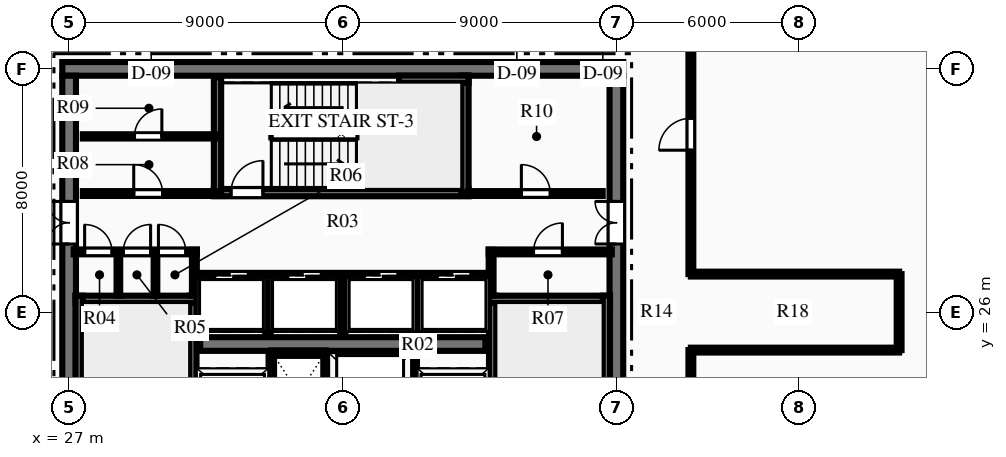
"""IFC4 building model, lengths in metres.
Left out: names, types, materials, properties, quantities, classifications, styles, units other than length and angle.
Written with IfcOpenShell. Run it as: python <this file> out.ifc"""

import sys

from ifc_helpers import new_model, si_unit, direction, frame, frame_2d, origin, place, context, subcontext, project, spatial, rectangle, extrude, element, fill, save


model = new_model("IFC4")
c1 = context("Model", 3, precision=1e-05, world=origin(), true_north=direction((0.0, 1.0)))
c2 = subcontext(c1, "Body", "Model", "MODEL_VIEW")
j1 = project(units=[si_unit("LENGTHUNIT", "METRE"), si_unit("PLANEANGLEUNIT", "RADIAN")], contexts=[c1])
p1 = place(None, origin())
s1 = spatial("IfcSite", under=j1, at=p1, CompositionType="ELEMENT")
p2 = place(p1, origin())
s2 = spatial("IfcBuilding", under=s1, at=p2, CompositionType="ELEMENT")
p3 = place(p2, frame((0.0, 0.0, 328.95)))
s3 = spatial("IfcBuildingStorey", under=s2, at=p3, CompositionType="ELEMENT", Elevation=328.95)
p4 = place(p3, frame((26.775, 34.0, 0.0), z_axis=(0.0, 0.0, 1.0), x_axis=(1.0, 0.0, 0.0)))
e1 = element("IfcWall", 1, at=p4, inside=s3, PredefinedType="SHEAR", context=c2, shape_type="SweptSolid", body=[
    extrude(rectangle(XDim=18.45, YDim=0.45, at=frame_2d((9.225, 0.0))), origin(), (0.0, 0.0, 1.0), 3.75),
])
p5 = place(p3, frame((27.0, 18.225, 0.0), z_axis=(0.0, 0.0, 1.0), x_axis=(0.0, 1.0, 0.0)))
e2 = element("IfcWall", 2, at=p5, inside=s3, PredefinedType="SHEAR", context=c2, shape_type="SweptSolid", body=[
    extrude(rectangle(XDim=15.55, YDim=0.45, at=frame_2d((7.775, 0.0))), origin(), (0.0, 0.0, 1.0), 3.75),
])
p6 = place(p5, frame((10.015, 0.0, 0.0)))
e3 = element("IfcOpeningElement", 3, at=p6, cuts=e2, PredefinedType="OPENING", context=c2, shape_type="SweptSolid", body=[
    extrude(rectangle(XDim=1.4, YDim=2.2, at=frame_2d((0.7, 1.1))), frame((0.0, 0.235, 0.0), z_axis=(0.0, -1.0, 0.0), x_axis=(1.0, 0.0, 0.0)), (0.0, 0.0, 1.0), 0.47),
])
p7 = place(p3, frame((45.0, 18.225, 0.0), z_axis=(0.0, 0.0, 1.0), x_axis=(0.0, 1.0, 0.0)))
e4 = element("IfcWall", 4, at=p7, inside=s3, PredefinedType="SHEAR", context=c2, shape_type="SweptSolid", body=[
    extrude(rectangle(XDim=15.55, YDim=0.45, at=frame_2d((7.775, 0.0))), origin(), (0.0, 0.0, 1.0), 3.75),
])
p8 = place(p7, frame((10.015, 0.0, 0.0)))
e5 = element("IfcOpeningElement", 5, at=p8, cuts=e4, PredefinedType="OPENING", context=c2, shape_type="SweptSolid", body=[
    extrude(rectangle(XDim=1.4, YDim=2.2, at=frame_2d((0.7, 1.1))), frame((0.0, 0.235, 0.0), z_axis=(0.0, -1.0, 0.0), x_axis=(1.0, 0.0, 0.0)), (0.0, 0.0, 1.0), 0.47),
])
p9 = place(p3, frame((31.31, 24.95, 0.0), z_axis=(0.0, 0.0, 1.0), x_axis=(1.0, 0.0, 0.0)))
e6 = element("IfcWall", 6, at=p9, inside=s3, PredefinedType="SHEAR", context=c2, shape_type="SweptSolid", body=[
    extrude(rectangle(XDim=9.38, YDim=0.45, at=frame_2d((4.69, 0.0))), origin(), (0.0, 0.0, 1.0), 3.75),
])
p10 = place(p3, frame((31.07, 18.28, 0.0), z_axis=(0.0, 0.0, 1.0), x_axis=(0.0, 1.0, 0.0)))
e7 = element("IfcWall", 7, at=p10, inside=s3, PredefinedType="SHEAR", context=c2, shape_type="SweptSolid", body=[
    extrude(rectangle(XDim=8.26, YDim=0.24, at=frame_2d((4.13, 0.0))), origin(), (0.0, 0.0, 1.0), 3.75),
])
p11 = place(p10, frame((0.365, 0.0, 0.0)))
e8 = element("IfcOpeningElement", 8, at=p11, cuts=e7, PredefinedType="OPENING", context=c2, shape_type="SweptSolid", body=[
    extrude(rectangle(XDim=1.05, YDim=2.15, at=frame_2d((0.525, 1.075))), frame((0.0, 0.13, 0.0), z_axis=(0.0, -1.0, 0.0), x_axis=(1.0, 0.0, 0.0)), (0.0, 0.0, 1.0), 0.26),
])
p12 = place(p3, frame((27.21, 26.42, 0.0), z_axis=(0.0, 0.0, 1.0), x_axis=(1.0, 0.0, 0.0)))
e9 = element("IfcWall", 9, at=p12, inside=s3, PredefinedType="SHEAR", context=c2, shape_type="SweptSolid", body=[
    extrude(rectangle(XDim=3.98, YDim=0.24, at=frame_2d((1.99, 0.0))), origin(), (0.0, 0.0, 1.0), 3.75),
])
p13 = place(p3, frame((27.33, 18.28, 0.0), z_axis=(0.0, 0.0, 1.0), x_axis=(0.0, 1.0, 0.0)))
e10 = element("IfcWall", 10, at=p13, inside=s3, PredefinedType="SHEAR", context=c2, shape_type="SweptSolid", body=[
    extrude(rectangle(XDim=8.26, YDim=0.24, at=frame_2d((4.13, 0.0))), origin(), (0.0, 0.0, 1.0), 3.75),
])
p14 = place(p3, frame((40.93, 18.28, 0.0), z_axis=(0.0, 0.0, 1.0), x_axis=(0.0, 1.0, 0.0)))
e11 = element("IfcWall", 11, at=p14, inside=s3, PredefinedType="SHEAR", context=c2, shape_type="SweptSolid", body=[
    extrude(rectangle(XDim=8.26, YDim=0.24, at=frame_2d((4.13, 0.0))), origin(), (0.0, 0.0, 1.0), 3.75),
])
p15 = place(p14, frame((0.365, 0.0, 0.0)))
e12 = element("IfcOpeningElement", 12, at=p15, cuts=e11, PredefinedType="OPENING", context=c2, shape_type="SweptSolid", body=[
    extrude(rectangle(XDim=1.05, YDim=2.15, at=frame_2d((0.525, 1.075))), frame((0.0, 0.13, 0.0), z_axis=(0.0, -1.0, 0.0), x_axis=(1.0, 0.0, 0.0)), (0.0, 0.0, 1.0), 0.26),
])
p16 = place(p3, frame((40.81, 26.42, 0.0), z_axis=(0.0, 0.0, 1.0), x_axis=(1.0, 0.0, 0.0)))
e13 = element("IfcWall", 13, at=p16, inside=s3, PredefinedType="SHEAR", context=c2, shape_type="SweptSolid", body=[
    extrude(rectangle(XDim=3.98, YDim=0.24, at=frame_2d((1.99, 0.0))), origin(), (0.0, 0.0, 1.0), 3.75),
])
p17 = place(p3, frame((44.67, 18.28, 0.0), z_axis=(0.0, 0.0, 1.0), x_axis=(0.0, 1.0, 0.0)))
e14 = element("IfcWall", 14, at=p17, inside=s3, PredefinedType="SHEAR", context=c2, shape_type="SweptSolid", body=[
    extrude(rectangle(XDim=8.26, YDim=0.24, at=frame_2d((4.13, 0.0))), origin(), (0.0, 0.0, 1.0), 3.75),
])
p18 = place(p3, frame((31.76, 29.93, 0.0), z_axis=(0.0, 0.0, 1.0), x_axis=(1.0, 0.0, 0.0)))
e15 = element("IfcWall", 15, at=p18, inside=s3, PredefinedType="SHEAR", context=c2, shape_type="SweptSolid", body=[
    extrude(rectangle(XDim=8.38, YDim=0.24, at=frame_2d((4.19, 0.0))), origin(), (0.0, 0.0, 1.0), 3.75),
])
p19 = place(p18, frame((0.565, 0.0, 0.0)))
e16 = element("IfcOpeningElement", 16, at=p19, cuts=e15, PredefinedType="OPENING", context=c2, shape_type="SweptSolid", body=[
    extrude(rectangle(XDim=1.05, YDim=2.15, at=frame_2d((0.525, 1.075))), frame((0.0, 0.13, 0.0), z_axis=(0.0, -1.0, 0.0), x_axis=(1.0, 0.0, 0.0)), (0.0, 0.0, 1.0), 0.26),
])
p20 = place(p3, frame((31.88, 29.93, 0.0), z_axis=(0.0, 0.0, 1.0), x_axis=(0.0, 1.0, 0.0)))
e17 = element("IfcWall", 17, at=p20, inside=s3, PredefinedType="SHEAR", context=c2, shape_type="SweptSolid", body=[
    extrude(rectangle(XDim=3.79, YDim=0.24, at=frame_2d((1.895, 0.0))), origin(), (0.0, 0.0, 1.0), 3.75),
])
p21 = place(p3, frame((40.02, 29.93, 0.0), z_axis=(0.0, 0.0, 1.0), x_axis=(0.0, 1.0, 0.0)))
e18 = element("IfcWall", 18, at=p21, inside=s3, PredefinedType="SHEAR", context=c2, shape_type="SweptSolid", body=[
    extrude(rectangle(XDim=3.85, YDim=0.24, at=frame_2d((1.925, 0.0))), origin(), (0.0, 0.0, 1.0), 3.75),
])
p22 = place(p3, frame((37.85, 33.66, 0.0), z_axis=(0.0, 0.0, 1.0), x_axis=(1.0, 0.0, 0.0)))
e19 = element("IfcWall", 19, at=p22, inside=s3, PredefinedType="SHEAR", context=c2, shape_type="SweptSolid", body=[
    extrude(rectangle(XDim=2.29, YDim=0.24, at=frame_2d((1.145, 0.0))), origin(), (0.0, 0.0, 1.0), 3.75),
])
for number, where, z_axis, x_axis in (
    (20, (33.65, 22.05, 0.0), (0.0, 0.0, 1.0), (0.0, 1.0, 0.0)),
    (21, (35.45, 22.05, 0.0), (0.0, 0.0, 1.0), (0.0, 1.0, 0.0)),
):
    element("IfcWall", number, at=place(p3, frame(where, z_axis=z_axis, x_axis=x_axis)), inside=s3, PredefinedType="PARTITIONING", context=c2, shape_type="SweptSolid", body=[
        extrude(rectangle(XDim=2.6, YDim=0.18, at=frame_2d((1.3, 0.0))), origin(), (0.0, 0.0, 1.0), 3.49),
    ])
p23 = place(p3, frame((33.65, 24.65, 0.0), z_axis=(0.0, 0.0, 1.0), x_axis=(1.0, 0.0, 0.0)))
e22 = element("IfcWall", 22, at=p23, inside=s3, PredefinedType="PARTITIONING", context=c2, shape_type="SweptSolid", body=[
    extrude(rectangle(XDim=1.8, YDim=0.18, at=frame_2d((0.9, 0.0))), origin(), (0.0, 0.0, 1.0), 3.49),
])
p24 = place(p3, frame((38.35, 22.05, 0.0), z_axis=(0.0, 0.0, 1.0), x_axis=(0.0, 1.0, 0.0)))
e23 = element("IfcWall", 23, at=p24, inside=s3, PredefinedType="PARTITIONING", context=c2, shape_type="SweptSolid", body=[
    extrude(rectangle(XDim=2.6, YDim=0.18, at=frame_2d((1.3, 0.0))), origin(), (0.0, 0.0, 1.0), 3.49),
])
p25 = place(p3, frame((27.15, 27.98, 0.0), z_axis=(0.0, 0.0, 1.0), x_axis=(1.0, 0.0, 0.0)))
e24 = element("IfcWall", 24, at=p25, inside=s3, PredefinedType="PARTITIONING", context=c2, shape_type="SweptSolid", body=[
    extrude(rectangle(XDim=4.05, YDim=0.16, at=frame_2d((2.025, 0.0))), origin(), (0.0, 0.0, 1.0), 3.49),
])
p26 = place(p25, frame((0.36, 0.0, 0.0)))
e25 = element("IfcOpeningElement", 25, at=p26, cuts=e24, PredefinedType="OPENING", context=c2, shape_type="SweptSolid", body=[
    extrude(rectangle(XDim=0.9, YDim=2.15, at=frame_2d((0.45, 1.075))), frame((0.0, 0.09, 0.0), z_axis=(0.0, -1.0, 0.0), x_axis=(1.0, 0.0, 0.0)), (0.0, 0.0, 1.0), 0.18),
])
p27 = place(p25, frame((1.63, 0.0, 0.0)))
e26 = element("IfcOpeningElement", 26, at=p27, cuts=e24, PredefinedType="OPENING", context=c2, shape_type="SweptSolid", body=[
    extrude(rectangle(XDim=0.9, YDim=2.15, at=frame_2d((0.45, 1.075))), frame((0.0, 0.09, 0.0), z_axis=(0.0, -1.0, 0.0), x_axis=(1.0, 0.0, 0.0)), (0.0, 0.0, 1.0), 0.18),
])
p28 = place(p25, frame((2.788, 0.0, 0.0)))
e27 = element("IfcOpeningElement", 27, at=p28, cuts=e24, PredefinedType="OPENING", context=c2, shape_type="SweptSolid", body=[
    extrude(rectangle(XDim=0.9, YDim=2.15, at=frame_2d((0.45, 1.075))), frame((0.0, 0.09, 0.0), z_axis=(0.0, -1.0, 0.0), x_axis=(1.0, 0.0, 0.0)), (0.0, 0.0, 1.0), 0.18),
])
p29 = place(p3, frame((31.12, 26.54, 0.0), z_axis=(0.0, 0.0, 1.0), x_axis=(0.0, 1.0, 0.0)))
e28 = element("IfcWall", 28, at=p29, inside=s3, PredefinedType="PARTITIONING", context=c2, shape_type="SweptSolid", body=[
    extrude(rectangle(XDim=1.51, YDim=0.16, at=frame_2d((0.755, 0.0))), origin(), (0.0, 0.0, 1.0), 3.49),
])
p30 = place(p3, frame((40.8, 27.98, 0.0), z_axis=(0.0, 0.0, 1.0), x_axis=(1.0, 0.0, 0.0)))
e29 = element("IfcWall", 29, at=p30, inside=s3, PredefinedType="PARTITIONING", context=c2, shape_type="SweptSolid", body=[
    extrude(rectangle(XDim=4.05, YDim=0.16, at=frame_2d((2.025, 0.0))), origin(), (0.0, 0.0, 1.0), 3.49),
])
p31 = place(p30, frame((1.475, 0.0, 0.0)))
e30 = element("IfcOpeningElement", 30, at=p31, cuts=e29, PredefinedType="OPENING", context=c2, shape_type="SweptSolid", body=[
    extrude(rectangle(XDim=0.95, YDim=2.15, at=frame_2d((0.475, 1.075))), frame((0.0, 0.09, 0.0), z_axis=(0.0, -1.0, 0.0), x_axis=(1.0, 0.0, 0.0)), (0.0, 0.0, 1.0), 0.18),
])
p32 = place(p3, frame((40.88, 26.54, 0.0), z_axis=(0.0, 0.0, 1.0), x_axis=(0.0, 1.0, 0.0)))
e31 = element("IfcWall", 31, at=p32, inside=s3, PredefinedType="PARTITIONING", context=c2, shape_type="SweptSolid", body=[
    extrude(rectangle(XDim=1.51, YDim=0.16, at=frame_2d((0.755, 0.0))), origin(), (0.0, 0.0, 1.0), 3.49),
])
for number, where, z_axis, x_axis in (
    (32, (28.62, 26.54, 0.0), (0.0, 0.0, 1.0), (0.0, 1.0, 0.0)),
    (33, (29.84, 26.54, 0.0), (0.0, 0.0, 1.0), (0.0, 1.0, 0.0)),
):
    element("IfcWall", number, at=place(p3, frame(where, z_axis=z_axis, x_axis=x_axis)), inside=s3, PredefinedType="PARTITIONING", context=c2, shape_type="SweptSolid", body=[
        extrude(rectangle(XDim=1.44, YDim=0.12, at=frame_2d((0.72, 0.0))), origin(), (0.0, 0.0, 1.0), 3.49),
    ])
p33 = place(p3, frame((27.45, 29.9, 0.0), z_axis=(0.0, 0.0, 1.0), x_axis=(1.0, 0.0, 0.0)))
e34 = element("IfcWall", 34, at=p33, inside=s3, PredefinedType="PARTITIONING", context=c2, shape_type="SweptSolid", body=[
    extrude(rectangle(XDim=4.43, YDim=0.16, at=frame_2d((2.215, 0.0))), origin(), (0.0, 0.0, 1.0), 3.49),
])
p34 = place(p33, frame((1.675, 0.0, 0.0)))
e35 = element("IfcOpeningElement", 35, at=p34, cuts=e34, PredefinedType="OPENING", context=c2, shape_type="SweptSolid", body=[
    extrude(rectangle(XDim=0.95, YDim=2.15, at=frame_2d((0.475, 1.075))), frame((0.0, 0.09, 0.0), z_axis=(0.0, -1.0, 0.0), x_axis=(1.0, 0.0, 0.0)), (0.0, 0.0, 1.0), 0.18),
])
p35 = place(p3, frame((27.45, 31.78, 0.0), z_axis=(0.0, 0.0, 1.0), x_axis=(1.0, 0.0, 0.0)))
e36 = element("IfcWall", 36, at=p35, inside=s3, PredefinedType="PARTITIONING", context=c2, shape_type="SweptSolid", body=[
    extrude(rectangle(XDim=4.35, YDim=0.14, at=frame_2d((2.175, 0.0))), origin(), (0.0, 0.0, 1.0), 3.49),
])
p36 = place(p35, frame((1.7, 0.0, 0.0)))
e37 = element("IfcOpeningElement", 37, at=p36, cuts=e36, PredefinedType="OPENING", context=c2, shape_type="SweptSolid", body=[
    extrude(rectangle(XDim=0.9, YDim=2.15, at=frame_2d((0.45, 1.075))), frame((0.0, 0.08, 0.0), z_axis=(0.0, -1.0, 0.0), x_axis=(1.0, 0.0, 0.0)), (0.0, 0.0, 1.0), 0.16),
])
p37 = place(p3, frame((40.12, 29.9, 0.0), z_axis=(0.0, 0.0, 1.0), x_axis=(1.0, 0.0, 0.0)))
e38 = element("IfcWall", 38, at=p37, inside=s3, PredefinedType="PARTITIONING", context=c2, shape_type="SweptSolid", body=[
    extrude(rectangle(XDim=4.43, YDim=0.16, at=frame_2d((2.215, 0.0))), origin(), (0.0, 0.0, 1.0), 3.49),
])
p38 = place(p37, frame((1.755, 0.0, 0.0)))
e39 = element("IfcOpeningElement", 39, at=p38, cuts=e38, PredefinedType="OPENING", context=c2, shape_type="SweptSolid", body=[
    extrude(rectangle(XDim=0.95, YDim=2.15, at=frame_2d((0.475, 1.075))), frame((0.0, 0.09, 0.0), z_axis=(0.0, -1.0, 0.0), x_axis=(1.0, 0.0, 0.0)), (0.0, 0.0, 1.0), 0.18),
])
p39 = place(p3, frame((31.2, 27.2, 0.0), z_axis=(0.0, 0.0, 1.0), x_axis=(1.0, 0.0, 0.0)))
e40 = element("IfcWall", 40, at=p39, inside=s3, PredefinedType="PARTITIONING", context=c2, shape_type="SweptSolid", body=[
    extrude(rectangle(XDim=9.6, YDim=0.18, at=frame_2d((4.8, 0.0))), origin(), (0.0, 0.0, 1.0), 3.49),
])
p40 = place(p39, frame((0.59, 0.0, 0.0)))
e41 = element("IfcOpeningElement", 41, at=p40, cuts=e40, PredefinedType="OPENING", context=c2, shape_type="SweptSolid", body=[
    extrude(rectangle(XDim=1.1, YDim=2.15, at=frame_2d((0.55, 1.075))), frame((0.0, 0.1, 0.0), z_axis=(0.0, -1.0, 0.0), x_axis=(1.0, 0.0, 0.0)), (0.0, 0.0, 1.0), 0.2),
])
p41 = place(p39, frame((2.99, 0.0, 0.0)))
e42 = element("IfcOpeningElement", 42, at=p41, cuts=e40, PredefinedType="OPENING", context=c2, shape_type="SweptSolid", body=[
    extrude(rectangle(XDim=1.1, YDim=2.15, at=frame_2d((0.55, 1.075))), frame((0.0, 0.1, 0.0), z_axis=(0.0, -1.0, 0.0), x_axis=(1.0, 0.0, 0.0)), (0.0, 0.0, 1.0), 0.2),
])
p42 = place(p39, frame((5.51, 0.0, 0.0)))
e43 = element("IfcOpeningElement", 43, at=p42, cuts=e40, PredefinedType="OPENING", context=c2, shape_type="SweptSolid", body=[
    extrude(rectangle(XDim=1.1, YDim=2.15, at=frame_2d((0.55, 1.075))), frame((0.0, 0.1, 0.0), z_axis=(0.0, -1.0, 0.0), x_axis=(1.0, 0.0, 0.0)), (0.0, 0.0, 1.0), 0.2),
])
p43 = place(p39, frame((7.91, 0.0, 0.0)))
e44 = element("IfcOpeningElement", 44, at=p43, cuts=e40, PredefinedType="OPENING", context=c2, shape_type="SweptSolid", body=[
    extrude(rectangle(XDim=1.1, YDim=2.15, at=frame_2d((0.55, 1.075))), frame((0.0, 0.1, 0.0), z_axis=(0.0, -1.0, 0.0), x_axis=(1.0, 0.0, 0.0)), (0.0, 0.0, 1.0), 0.2),
])
for number, where, z_axis, x_axis in (
    (45, (33.54, 25.3, 0.0), (0.0, 0.0, 1.0), (0.0, 1.0, 0.0)),
    (46, (36.0, 25.3, 0.0), (0.0, 0.0, 1.0), (0.0, 1.0, 0.0)),
    (47, (38.46, 25.3, 0.0), (0.0, 0.0, 1.0), (0.0, 1.0, 0.0)),
):
    element("IfcWall", number, at=place(p3, frame(where, z_axis=z_axis, x_axis=x_axis)), inside=s3, PredefinedType="PARTITIONING", context=c2, shape_type="SweptSolid", body=[
        extrude(rectangle(XDim=1.9, YDim=0.18, at=frame_2d((0.95, 0.0))), origin(), (0.0, 0.0, 1.0), 3.49),
    ])
p44 = place(p3, frame((47.45, 15.55, 0.0), z_axis=(0.0, 0.0, 1.0), x_axis=(0.0, 1.0, 0.0)))
e48 = element("IfcWall", 48, at=p44, inside=s3, PredefinedType="PARTITIONING", context=c2, shape_type="SweptSolid", body=[
    extrude(rectangle(XDim=9.2, YDim=0.16, at=frame_2d((4.6, 0.0))), origin(), (0.0, 0.0, 1.0), 3.49),
])
p45 = place(p3, frame((47.45, 27.25, 0.0), z_axis=(0.0, 0.0, 1.0), x_axis=(0.0, 1.0, 0.0)))
e49 = element("IfcWall", 49, at=p45, inside=s3, PredefinedType="PARTITIONING", context=c2, shape_type="SweptSolid", body=[
    extrude(rectangle(XDim=9.2, YDim=0.16, at=frame_2d((4.6, 0.0))), origin(), (0.0, 0.0, 1.0), 3.49),
])
p46 = place(p45, frame((4.075, 0.0, 0.0)))
e50 = element("IfcOpeningElement", 50, at=p46, cuts=e49, PredefinedType="OPENING", context=c2, shape_type="SweptSolid", body=[
    extrude(rectangle(XDim=1.05, YDim=2.15, at=frame_2d((0.525, 1.075))), frame((0.0, 0.09, 0.0), z_axis=(0.0, -1.0, 0.0), x_axis=(1.0, 0.0, 0.0)), (0.0, 0.0, 1.0), 0.18),
])
for number, where, z_axis, x_axis in (
    (51, (47.45, 24.75, 0.0), (0.0, 0.0, 1.0), (1.0, 0.0, 0.0)),
    (52, (47.45, 27.25, 0.0), (0.0, 0.0, 1.0), (1.0, 0.0, 0.0)),
):
    element("IfcWall", number, at=place(p3, frame(where, z_axis=z_axis, x_axis=x_axis)), inside=s3, PredefinedType="PARTITIONING", context=c2, shape_type="SweptSolid", body=[
        extrude(rectangle(XDim=6.85, YDim=0.16, at=frame_2d((3.425, 0.0))), origin(), (0.0, 0.0, 1.0), 3.49),
    ])
p47 = place(p3, frame((54.3, 24.75, 0.0), z_axis=(0.0, 0.0, 1.0), x_axis=(0.0, 1.0, 0.0)))
e53 = element("IfcWall", 53, at=p47, inside=s3, PredefinedType="PARTITIONING", context=c2, shape_type="SweptSolid", body=[
    extrude(rectangle(XDim=2.5, YDim=0.16, at=frame_2d((1.25, 0.0))), origin(), (0.0, 0.0, 1.0), 3.49),
])
p48 = place(p26, origin())
e54 = element("IfcDoor", 54, at=p48, inside=s3, OperationType="SINGLE_SWING_LEFT", PredefinedType="DOOR", context=c2, shape_type="SweptSolid", body=[
    extrude(rectangle(XDim=0.9, YDim=2.15, at=frame_2d((0.45, 1.075))), frame((0.0, 0.025, 0.0), z_axis=(0.0, -1.0, 0.0), x_axis=(1.0, 0.0, 0.0)), (0.0, 0.0, 1.0), 0.05),
])
fill(e25, e54)
p49 = place(p27, origin())
e55 = element("IfcDoor", 55, at=p49, inside=s3, OperationType="SINGLE_SWING_RIGHT", PredefinedType="DOOR", context=c2, shape_type="SweptSolid", body=[
    extrude(rectangle(XDim=0.9, YDim=2.15, at=frame_2d((0.45, 1.075))), frame((0.0, 0.025, 0.0), z_axis=(0.0, -1.0, 0.0), x_axis=(1.0, 0.0, 0.0)), (0.0, 0.0, 1.0), 0.05),
])
fill(e26, e55)
p50 = place(p28, origin())
e56 = element("IfcDoor", 56, at=p50, inside=s3, OperationType="SINGLE_SWING_LEFT", PredefinedType="DOOR", context=c2, shape_type="SweptSolid", body=[
    extrude(rectangle(XDim=0.9, YDim=2.15, at=frame_2d((0.45, 1.075))), frame((0.0, 0.025, 0.0), z_axis=(0.0, -1.0, 0.0), x_axis=(1.0, 0.0, 0.0)), (0.0, 0.0, 1.0), 0.05),
])
fill(e27, e56)
p51 = place(p31, origin())
e57 = element("IfcDoor", 57, at=p51, inside=s3, OperationType="SINGLE_SWING_RIGHT", PredefinedType="DOOR", context=c2, shape_type="SweptSolid", body=[
    extrude(rectangle(XDim=0.95, YDim=2.15, at=frame_2d((0.475, 1.075))), frame((0.0, 0.025, 0.0), z_axis=(0.0, -1.0, 0.0), x_axis=(1.0, 0.0, 0.0)), (0.0, 0.0, 1.0), 0.05),
])
fill(e30, e57)
p52 = place(p34, origin())
e58 = element("IfcDoor", 58, at=p52, inside=s3, OperationType="SINGLE_SWING_LEFT", PredefinedType="DOOR", context=c2, shape_type="SweptSolid", body=[
    extrude(rectangle(XDim=0.95, YDim=2.15, at=frame_2d((0.475, 1.075))), frame((0.0, 0.025, 0.0), z_axis=(0.0, -1.0, 0.0), x_axis=(1.0, 0.0, 0.0)), (0.0, 0.0, 1.0), 0.05),
])
fill(e35, e58)
p53 = place(p36, origin())
e59 = element("IfcDoor", 59, at=p53, inside=s3, OperationType="SINGLE_SWING_RIGHT", PredefinedType="DOOR", context=c2, shape_type="SweptSolid", body=[
    extrude(rectangle(XDim=0.9, YDim=2.15, at=frame_2d((0.45, 1.075))), frame((0.0, 0.025, 0.0), z_axis=(0.0, -1.0, 0.0), x_axis=(1.0, 0.0, 0.0)), (0.0, 0.0, 1.0), 0.05),
])
fill(e37, e59)
p54 = place(p38, origin())
e60 = element("IfcDoor", 60, at=p54, inside=s3, OperationType="SINGLE_SWING_LEFT", PredefinedType="DOOR", context=c2, shape_type="SweptSolid", body=[
    extrude(rectangle(XDim=0.95, YDim=2.15, at=frame_2d((0.475, 1.075))), frame((0.0, 0.025, 0.0), z_axis=(0.0, -1.0, 0.0), x_axis=(1.0, 0.0, 0.0)), (0.0, 0.0, 1.0), 0.05),
])
fill(e39, e60)
p55 = place(p19, origin())
e61 = element("IfcDoor", 61, at=p55, inside=s3, OperationType="SINGLE_SWING_RIGHT", PredefinedType="DOOR", context=c2, shape_type="SweptSolid", body=[
    extrude(rectangle(XDim=1.05, YDim=2.15, at=frame_2d((0.525, 1.075))), frame((0.0, 0.025, 0.0), z_axis=(0.0, -1.0, 0.0), x_axis=(1.0, 0.0, 0.0)), (0.0, 0.0, 1.0), 0.05),
])
fill(e16, e61)
p56 = place(p6, origin())
e62 = element("IfcDoor", 62, at=p56, inside=s3, OperationType="DOUBLE_DOOR_SINGLE_SWING", PredefinedType="DOOR", context=c2, shape_type="SweptSolid", body=[
    extrude(rectangle(XDim=1.4, YDim=2.2, at=frame_2d((0.7, 1.1))), frame((0.0, 0.025, 0.0), z_axis=(0.0, -1.0, 0.0), x_axis=(1.0, 0.0, 0.0)), (0.0, 0.0, 1.0), 0.05),
])
fill(e3, e62)
p57 = place(p8, origin())
e63 = element("IfcDoor", 63, at=p57, inside=s3, OperationType="DOUBLE_DOOR_SINGLE_SWING", PredefinedType="DOOR", context=c2, shape_type="SweptSolid", body=[
    extrude(rectangle(XDim=1.4, YDim=2.2, at=frame_2d((0.7, 1.1))), frame((0.0, 0.025, 0.0), z_axis=(0.0, -1.0, 0.0), x_axis=(1.0, 0.0, 0.0)), (0.0, 0.0, 1.0), 0.05),
])
fill(e5, e63)
p58 = place(p46, origin())
e64 = element("IfcDoor", 64, at=p58, inside=s3, OperationType="SINGLE_SWING_LEFT", PredefinedType="DOOR", context=c2, shape_type="SweptSolid", body=[
    extrude(rectangle(XDim=1.05, YDim=2.15, at=frame_2d((0.525, 1.075))), frame((0.0, 0.025, 0.0), z_axis=(0.0, -1.0, 0.0), x_axis=(1.0, 0.0, 0.0)), (0.0, 0.0, 1.0), 0.05),
])
fill(e50, e64)
p59 = place(p40, origin())
e65 = element("IfcDoor", 65, at=p59, inside=s3, OperationType="SLIDING_TO_LEFT", PredefinedType="DOOR", context=c2, shape_type="SweptSolid", body=[
    extrude(rectangle(XDim=1.1, YDim=2.15, at=frame_2d((0.55, 1.075))), frame((0.0, 0.025, 0.0), z_axis=(0.0, -1.0, 0.0), x_axis=(1.0, 0.0, 0.0)), (0.0, 0.0, 1.0), 0.05),
])
fill(e41, e65)
p60 = place(p41, origin())
e66 = element("IfcDoor", 66, at=p60, inside=s3, OperationType="SLIDING_TO_LEFT", PredefinedType="DOOR", context=c2, shape_type="SweptSolid", body=[
    extrude(rectangle(XDim=1.1, YDim=2.15, at=frame_2d((0.55, 1.075))), frame((0.0, 0.025, 0.0), z_axis=(0.0, -1.0, 0.0), x_axis=(1.0, 0.0, 0.0)), (0.0, 0.0, 1.0), 0.05),
])
fill(e42, e66)
p61 = place(p42, origin())
e67 = element("IfcDoor", 67, at=p61, inside=s3, OperationType="SLIDING_TO_LEFT", PredefinedType="DOOR", context=c2, shape_type="SweptSolid", body=[
    extrude(rectangle(XDim=1.1, YDim=2.15, at=frame_2d((0.55, 1.075))), frame((0.0, 0.025, 0.0), z_axis=(0.0, -1.0, 0.0), x_axis=(1.0, 0.0, 0.0)), (0.0, 0.0, 1.0), 0.05),
])
fill(e43, e67)
p62 = place(p43, origin())
e68 = element("IfcDoor", 68, at=p62, inside=s3, OperationType="SLIDING_TO_LEFT", PredefinedType="DOOR", context=c2, shape_type="SweptSolid", body=[
    extrude(rectangle(XDim=1.1, YDim=2.15, at=frame_2d((0.55, 1.075))), frame((0.0, 0.025, 0.0), z_axis=(0.0, -1.0, 0.0), x_axis=(1.0, 0.0, 0.0)), (0.0, 0.0, 1.0), 0.05),
])
fill(e44, e68)
save(model, sys.argv[1])
